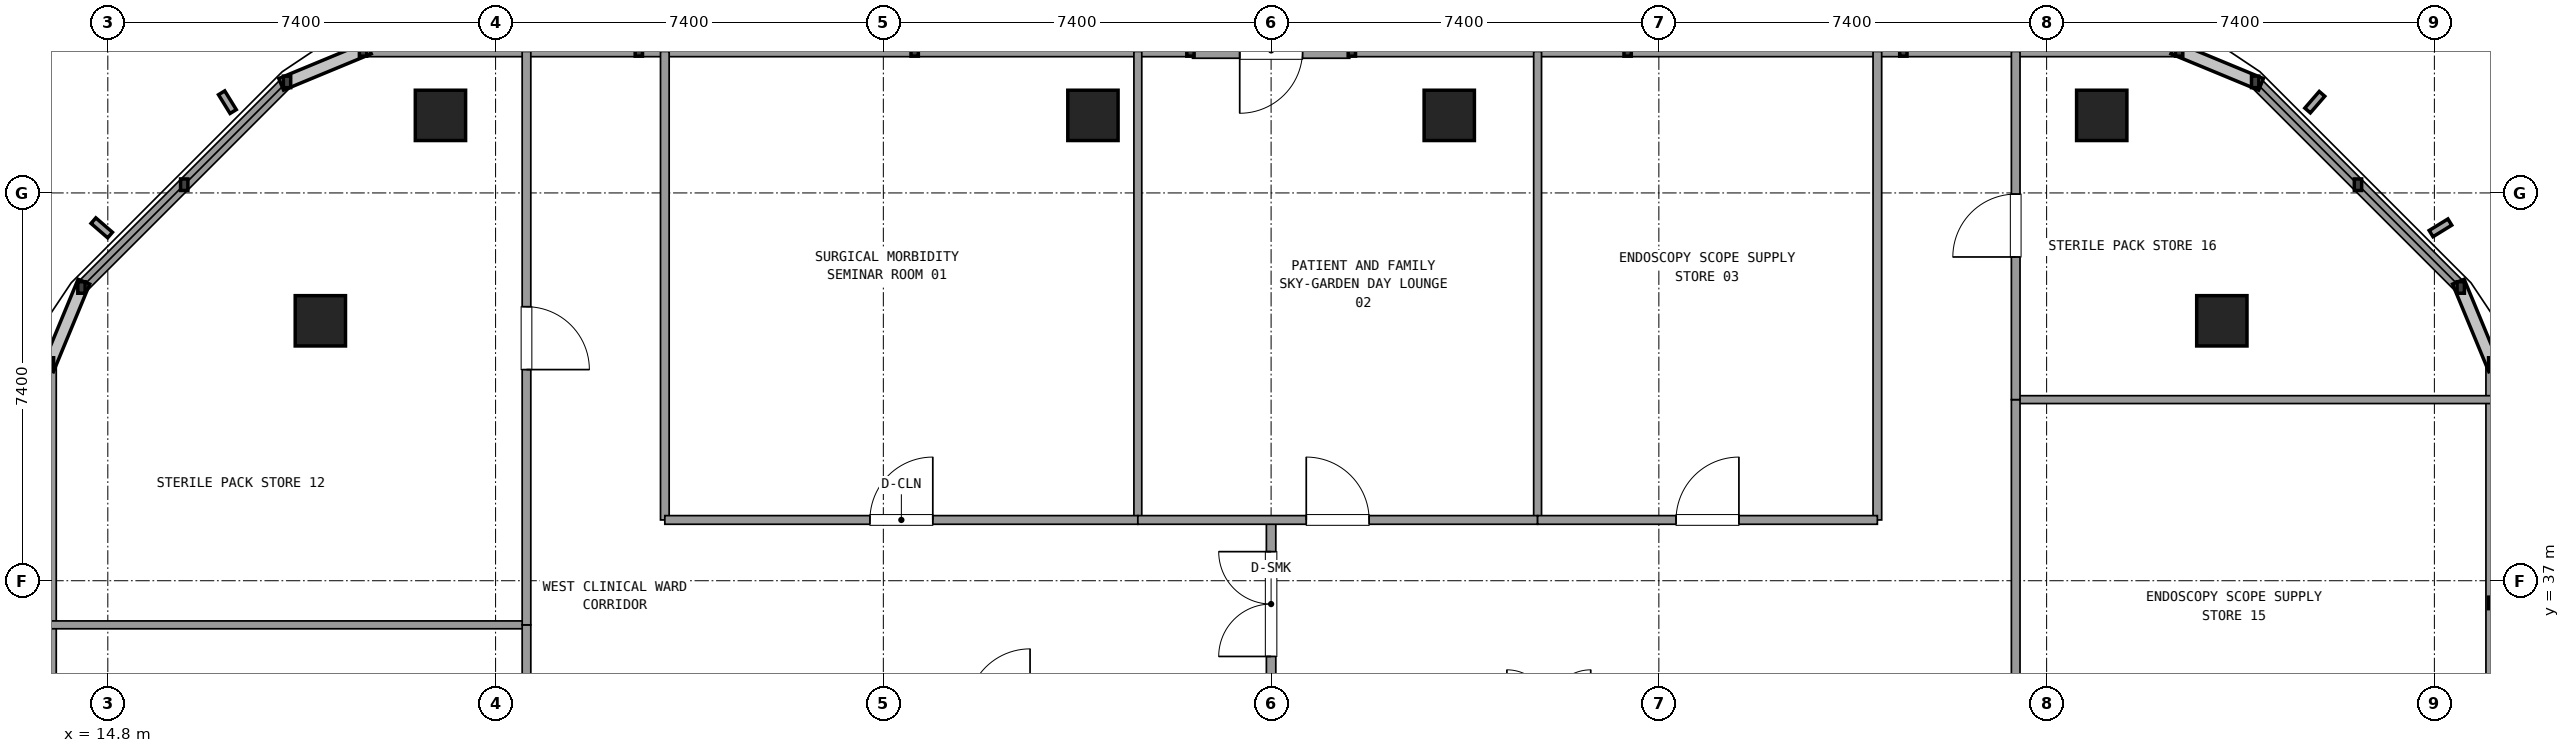
"""IFC4 building model, lengths in metres.
Left out: names, types, materials, properties, quantities, classifications, styles, units other than length and angle.
Written with IfcOpenShell. Run it as: python <this file> out.ifc"""

import sys

from ifc_helpers import new_model, si_unit, direction, frame, frame_2d, origin, origin_2d, place, context, subcontext, project, spatial, rectangle, extrude, element, fill, save


model = new_model("IFC4")
c1 = context("Model", 3, precision=1e-05, world=origin(), true_north=direction((0.0, 1.0)))
c2 = subcontext(c1, "Body", "Model", "MODEL_VIEW")
j1 = project(units=[si_unit("LENGTHUNIT", "METRE"), si_unit("PLANEANGLEUNIT", "RADIAN")], contexts=[c1])
p1 = place(None, origin())
s1 = spatial("IfcSite", under=j1, at=p1, CompositionType="ELEMENT")
p2 = place(p1, origin())
s2 = spatial("IfcBuilding", under=s1, at=p2, CompositionType="ELEMENT")
p3 = place(p2, frame((0.0, 0.0, 174.42)))
s3 = spatial("IfcBuildingStorey", under=s2, at=p3, CompositionType="ELEMENT", Elevation=174.42)
for number, where, z_axis, x_axis in (
    (1, (55.144, 41.96, 0.0), (0.0, 0.0, 1.0), (1.0, 0.0, 0.0)),
    (2, (52.852, 45.88, 0.0), (0.0, 0.0, 1.0), (1.0, 0.0, 0.0)),
):
    element("IfcColumn", number, at=place(p3, frame(where, z_axis=z_axis, x_axis=x_axis)), inside=s3, PredefinedType="COLUMN", context=c2, shape_type="SweptSolid", body=[
        extrude(rectangle(XDim=0.96, YDim=0.96, at=origin_2d()), origin(), (0.0, 0.0, 1.0), 3.578),
    ])
for number, where, z_axis, x_axis in (
    (3, (40.4, 45.88, 0.0), (0.0, 0.0, 1.0), (1.0, 0.0, 0.0)),
    (4, (33.6, 45.88, 0.0), (0.0, 0.0, 1.0), (1.0, 0.0, 0.0)),
):
    element("IfcColumn", number, at=place(p3, frame(where, z_axis=z_axis, x_axis=x_axis)), inside=s3, PredefinedType="COLUMN", context=c2, shape_type="SweptSolid", body=[
        extrude(rectangle(XDim=0.96, YDim=0.96, at=origin_2d()), origin(), (0.0, 0.0, 1.0), 3.579),
    ])
for number, where, z_axis, x_axis in (
    (5, (21.148, 45.88, 0.0), (0.0, 0.0, 1.0), (1.0, 0.0, 0.0)),
    (6, (18.856, 41.96, 0.0), (0.0, 0.0, 1.0), (1.0, 0.0, 0.0)),
):
    element("IfcColumn", number, at=place(p3, frame(where, z_axis=z_axis, x_axis=x_axis)), inside=s3, PredefinedType="COLUMN", context=c2, shape_type="SweptSolid", body=[
        extrude(rectangle(XDim=0.96, YDim=0.96, at=origin_2d()), origin(), (0.0, 0.0, 1.0), 3.578),
    ])
p4 = place(p3, frame((60.304, 27.44, 0.0), z_axis=(0.0, 0.0, 1.0), x_axis=(0.0, 1.0, 0.0)))
e7 = element("IfcWall", 7, at=p4, inside=s3, PredefinedType="SOLIDWALL", context=c2, shape_type="SweptSolid", body=[
    extrude(rectangle(XDim=13.705, YDim=0.24, at=frame_2d((6.853, 0.0))), origin(), (0.0, 0.0, 1.0), 0.85),
])
p5 = place(p3, frame((59.703, 42.596, 0.0), z_axis=(0.0, 0.0, 1.0), x_axis=(-0.707084777957, 0.707128783731, 0.0)))
e8 = element("IfcWall", 8, at=p5, inside=s3, PredefinedType="SOLIDWALL", context=c2, shape_type="SweptSolid", body=[
    extrude(rectangle(XDim=5.548, YDim=0.24, at=frame_2d((2.774, 0.0))), origin(), (0.0, 0.0, 1.0), 0.85),
])
p6 = place(p3, frame((38.501, 47.12, 0.0), z_axis=(0.0, 0.0, 1.0), x_axis=(-1.0, 0.0, 0.0)))
e9 = element("IfcWall", 9, at=p6, inside=s3, PredefinedType="SOLIDWALL", context=c2, shape_type="SweptSolid", body=[
    extrude(rectangle(XDim=3.0, YDim=0.3, at=frame_2d((1.5, 0.0))), origin(), (0.0, 0.0, 1.0), 2.65),
])
p7 = place(p6, frame((0.9, 0.0, 0.0)))
e10 = element("IfcOpeningElement", 10, at=p7, cuts=e9, PredefinedType="OPENING", context=c2, shape_type="SweptSolid", body=[
    extrude(rectangle(XDim=1.2, YDim=2.2, at=frame_2d((0.6, 1.1))), frame((0.0, 0.16, 0.0), z_axis=(0.0, -1.0, 0.0), x_axis=(1.0, 0.0, 0.0)), (0.0, 0.0, 1.0), 0.32),
])
p8 = place(p3, frame((54.329, 47.12, 0.0), z_axis=(0.0, 0.0, 1.0), x_axis=(-1.0, 0.0, 0.0)))
e11 = element("IfcWall", 11, at=p8, inside=s3, PredefinedType="SOLIDWALL", context=c2, shape_type="SweptSolid", body=[
    extrude(rectangle(XDim=15.788, YDim=0.24, at=frame_2d((7.894, 0.0))), origin(), (0.0, 0.0, 1.0), 0.85),
])
p9 = place(p3, frame((35.461, 47.12, 0.0), z_axis=(0.0, 0.0, 1.0), x_axis=(-1.0, 0.0, 0.0)))
e12 = element("IfcWall", 12, at=p9, inside=s3, PredefinedType="SOLIDWALL", context=c2, shape_type="SweptSolid", body=[
    extrude(rectangle(XDim=15.79, YDim=0.24, at=frame_2d((7.895, 0.0))), origin(), (0.0, 0.0, 1.0), 0.85),
])
p10 = place(p3, frame((18.22, 46.519, 0.0), z_axis=(0.0, 0.0, 1.0), x_axis=(-0.707084777957, -0.707128783731, 0.0)))
e13 = element("IfcWall", 13, at=p10, inside=s3, PredefinedType="SOLIDWALL", context=c2, shape_type="SweptSolid", body=[
    extrude(rectangle(XDim=5.548, YDim=0.24, at=frame_2d((2.774, 0.0))), origin(), (0.0, 0.0, 1.0), 0.85),
])
p11 = place(p3, frame((13.696, 41.145, 0.0), z_axis=(0.0, 0.0, 1.0), x_axis=(0.0, -1.0, 0.0)))
e14 = element("IfcWall", 14, at=p11, inside=s3, PredefinedType="SOLIDWALL", context=c2, shape_type="SweptSolid", body=[
    extrude(rectangle(XDim=30.49, YDim=0.24, at=frame_2d((15.245, 0.0))), origin(), (0.0, 0.0, 1.0), 0.85),
])
p12 = place(p3, frame((37.0, 34.95, 0.0), z_axis=(0.0, 0.0, 1.0), x_axis=(0.0, 1.0, 0.0)))
e15 = element("IfcWall", 15, at=p12, inside=s3, PredefinedType="PARTITIONING", context=c2, shape_type="SweptSolid", body=[
    extrude(rectangle(XDim=3.21, YDim=0.18, at=frame_2d((1.605, 0.0))), origin(), (0.0, 0.0, 1.0), 2.59),
])
p13 = place(p12, frame((0.605, 0.0, 0.0)))
e16 = element("IfcOpeningElement", 16, at=p13, cuts=e15, PredefinedType="OPENING", context=c2, shape_type="SweptSolid", body=[
    extrude(rectangle(XDim=2.0, YDim=2.2, at=frame_2d((1.0, 1.1))), frame((0.0, 0.1, 0.0), z_axis=(0.0, -1.0, 0.0), x_axis=(1.0, 0.0, 0.0)), (0.0, 0.0, 1.0), 0.2),
])
for number, where, z_axis, x_axis in (
    (17, (25.43, 38.16, 0.0), (0.0, 0.0, 1.0), (0.0, 1.0, 0.0)),
    (18, (48.57, 38.16, 0.0), (0.0, 0.0, 1.0), (0.0, 1.0, 0.0)),
):
    element("IfcWall", number, at=place(p3, frame(where, z_axis=z_axis, x_axis=x_axis)), inside=s3, PredefinedType="PARTITIONING", context=c2, shape_type="SweptSolid", body=[
        extrude(rectangle(XDim=8.94, YDim=0.165, at=frame_2d((4.47, 0.0))), origin(), (0.0, 0.0, 1.0), 2.59),
    ])
p14 = place(p3, frame((34.457, 38.16, 0.0), z_axis=(0.0, 0.0, 1.0), x_axis=(0.0, 1.0, 0.0)))
e19 = element("IfcWall", 19, at=p14, inside=s3, PredefinedType="PARTITIONING", context=c2, shape_type="SweptSolid", body=[
    extrude(rectangle(XDim=8.94, YDim=0.15, at=frame_2d((4.47, 0.0))), origin(), (0.0, 0.0, 1.0), 2.59),
])
p15 = place(p3, frame((25.43, 38.16, 0.0), z_axis=(0.0, 0.0, 1.0), x_axis=(1.0, 0.0, 0.0)))
e20 = element("IfcWall", 20, at=p15, inside=s3, PredefinedType="PARTITIONING", context=c2, shape_type="SweptSolid", body=[
    extrude(rectangle(XDim=9.027, YDim=0.165, at=frame_2d((4.514, 0.0))), origin(), (0.0, 0.0, 1.0), 2.59),
])
p16 = place(p15, frame((3.914, 0.0, 0.0)))
e21 = element("IfcOpeningElement", 21, at=p16, cuts=e20, PredefinedType="OPENING", context=c2, shape_type="SweptSolid", body=[
    extrude(rectangle(XDim=1.2, YDim=2.15, at=frame_2d((0.6, 1.075))), frame((0.0, 0.093, 0.0), z_axis=(0.0, -1.0, 0.0), x_axis=(1.0, 0.0, 0.0)), (0.0, 0.0, 1.0), 0.185),
])
p17 = place(p3, frame((42.086, 38.16, 0.0), z_axis=(0.0, 0.0, 1.0), x_axis=(0.0, 1.0, 0.0)))
e22 = element("IfcWall", 22, at=p17, inside=s3, PredefinedType="PARTITIONING", context=c2, shape_type="SweptSolid", body=[
    extrude(rectangle(XDim=8.94, YDim=0.15, at=frame_2d((4.47, 0.0))), origin(), (0.0, 0.0, 1.0), 2.59),
])
p18 = place(p3, frame((34.457, 38.16, 0.0), z_axis=(0.0, 0.0, 1.0), x_axis=(1.0, 0.0, 0.0)))
e23 = element("IfcWall", 23, at=p18, inside=s3, PredefinedType="PARTITIONING", context=c2, shape_type="SweptSolid", body=[
    extrude(rectangle(XDim=7.629, YDim=0.165, at=frame_2d((3.814, 0.0))), origin(), (0.0, 0.0, 1.0), 2.59),
])
p19 = place(p18, frame((3.214, 0.0, 0.0)))
e24 = element("IfcOpeningElement", 24, at=p19, cuts=e23, PredefinedType="OPENING", context=c2, shape_type="SweptSolid", body=[
    extrude(rectangle(XDim=1.2, YDim=2.15, at=frame_2d((0.6, 1.075))), frame((0.0, 0.093, 0.0), z_axis=(0.0, -1.0, 0.0), x_axis=(1.0, 0.0, 0.0)), (0.0, 0.0, 1.0), 0.185),
])
p20 = place(p3, frame((42.086, 38.16, 0.0), z_axis=(0.0, 0.0, 1.0), x_axis=(1.0, 0.0, 0.0)))
e25 = element("IfcWall", 25, at=p20, inside=s3, PredefinedType="PARTITIONING", context=c2, shape_type="SweptSolid", body=[
    extrude(rectangle(XDim=6.484, YDim=0.165, at=frame_2d((3.242, 0.0))), origin(), (0.0, 0.0, 1.0), 2.59),
])
p21 = place(p20, frame((2.642, 0.0, 0.0)))
e26 = element("IfcOpeningElement", 26, at=p21, cuts=e25, PredefinedType="OPENING", context=c2, shape_type="SweptSolid", body=[
    extrude(rectangle(XDim=1.2, YDim=2.15, at=frame_2d((0.6, 1.075))), frame((0.0, 0.093, 0.0), z_axis=(0.0, -1.0, 0.0), x_axis=(1.0, 0.0, 0.0)), (0.0, 0.0, 1.0), 0.185),
])
p22 = place(p3, frame((22.79, 36.158, 0.0), z_axis=(0.0, 0.0, 1.0), x_axis=(-1.0, 0.0, 0.0)))
e27 = element("IfcWall", 27, at=p22, inside=s3, PredefinedType="PARTITIONING", context=c2, shape_type="SweptSolid", body=[
    extrude(rectangle(XDim=9.074, YDim=0.15, at=frame_2d((4.537, 0.0))), origin(), (0.0, 0.0, 1.0), 2.59),
])
p23 = place(p3, frame((22.79, 27.56, 0.0), z_axis=(0.0, 0.0, 1.0), x_axis=(0.0, 1.0, 0.0)))
e28 = element("IfcWall", 28, at=p23, inside=s3, PredefinedType="PARTITIONING", context=c2, shape_type="SweptSolid", body=[
    extrude(rectangle(XDim=8.598, YDim=0.165, at=frame_2d((4.299, 0.0))), origin(), (0.0, 0.0, 1.0), 2.59),
])
p24 = place(p23, frame((3.699, 0.0, 0.0)))
e29 = element("IfcOpeningElement", 29, at=p24, cuts=e28, PredefinedType="OPENING", context=c2, shape_type="SweptSolid", body=[
    extrude(rectangle(XDim=1.2, YDim=2.15, at=frame_2d((0.6, 1.075))), frame((0.0, 0.093, 0.0), z_axis=(0.0, -1.0, 0.0), x_axis=(1.0, 0.0, 0.0)), (0.0, 0.0, 1.0), 0.185),
])
p25 = place(p3, frame((22.79, 36.158, 0.0), z_axis=(0.0, 0.0, 1.0), x_axis=(0.0, 1.0, 0.0)))
e30 = element("IfcWall", 30, at=p25, inside=s3, PredefinedType="PARTITIONING", context=c2, shape_type="SweptSolid", body=[
    extrude(rectangle(XDim=10.942, YDim=0.165, at=frame_2d((5.471, 0.0))), origin(), (0.0, 0.0, 1.0), 2.59),
])
p26 = place(p25, frame((4.871, 0.0, 0.0)))
e31 = element("IfcOpeningElement", 31, at=p26, cuts=e30, PredefinedType="OPENING", context=c2, shape_type="SweptSolid", body=[
    extrude(rectangle(XDim=1.2, YDim=2.15, at=frame_2d((0.6, 1.075))), frame((0.0, 0.093, 0.0), z_axis=(0.0, -1.0, 0.0), x_axis=(1.0, 0.0, 0.0)), (0.0, 0.0, 1.0), 0.185),
])
p27 = place(p3, frame((51.21, 40.456, 0.0), z_axis=(0.0, 0.0, 1.0), x_axis=(1.0, 0.0, 0.0)))
e32 = element("IfcWall", 32, at=p27, inside=s3, PredefinedType="PARTITIONING", context=c2, shape_type="SweptSolid", body=[
    extrude(rectangle(XDim=9.074, YDim=0.15, at=frame_2d((4.537, 0.0))), origin(), (0.0, 0.0, 1.0), 2.59),
])
p28 = place(p3, frame((51.21, 27.56, 0.0), z_axis=(0.0, 0.0, 1.0), x_axis=(0.0, 1.0, 0.0)))
e33 = element("IfcWall", 33, at=p28, inside=s3, PredefinedType="PARTITIONING", context=c2, shape_type="SweptSolid", body=[
    extrude(rectangle(XDim=12.896, YDim=0.165, at=frame_2d((6.448, 0.0))), origin(), (0.0, 0.0, 1.0), 2.59),
])
p29 = place(p28, frame((5.848, 0.0, 0.0)))
e34 = element("IfcOpeningElement", 34, at=p29, cuts=e33, PredefinedType="OPENING", context=c2, shape_type="SweptSolid", body=[
    extrude(rectangle(XDim=1.2, YDim=2.15, at=frame_2d((0.6, 1.075))), frame((0.0, 0.093, 0.0), z_axis=(0.0, -1.0, 0.0), x_axis=(1.0, 0.0, 0.0)), (0.0, 0.0, 1.0), 0.185),
])
p30 = place(p3, frame((51.21, 40.456, 0.0), z_axis=(0.0, 0.0, 1.0), x_axis=(0.0, 1.0, 0.0)))
e35 = element("IfcWall", 35, at=p30, inside=s3, PredefinedType="PARTITIONING", context=c2, shape_type="SweptSolid", body=[
    extrude(rectangle(XDim=6.644, YDim=0.165, at=frame_2d((3.322, 0.0))), origin(), (0.0, 0.0, 1.0), 2.59),
])
p31 = place(p30, frame((2.722, 0.0, 0.0)))
e36 = element("IfcOpeningElement", 36, at=p31, cuts=e35, PredefinedType="OPENING", context=c2, shape_type="SweptSolid", body=[
    extrude(rectangle(XDim=1.2, YDim=2.15, at=frame_2d((0.6, 1.075))), frame((0.0, 0.093, 0.0), z_axis=(0.0, -1.0, 0.0), x_axis=(1.0, 0.0, 0.0)), (0.0, 0.0, 1.0), 0.185),
])
p32 = place(p13, origin())
e37 = element("IfcDoor", 37, at=p32, inside=s3, OperationType="DOUBLE_DOOR_SINGLE_SWING", PredefinedType="DOOR", context=c2, shape_type="SweptSolid", body=[
    extrude(rectangle(XDim=2.0, YDim=2.2, at=frame_2d((1.0, 1.1))), frame((0.0, 0.025, 0.0), z_axis=(0.0, -1.0, 0.0), x_axis=(1.0, 0.0, 0.0)), (0.0, 0.0, 1.0), 0.05),
])
fill(e16, e37)
p33 = place(p16, origin())
e38 = element("IfcDoor", 38, at=p33, inside=s3, OperationType="SINGLE_SWING_RIGHT", PredefinedType="DOOR", context=c2, shape_type="SweptSolid", body=[
    extrude(rectangle(XDim=1.2, YDim=2.15, at=frame_2d((0.6, 1.075))), frame((0.0, 0.025, 0.0), z_axis=(0.0, -1.0, 0.0), x_axis=(1.0, 0.0, 0.0)), (0.0, 0.0, 1.0), 0.05),
])
fill(e21, e38)
p34 = place(p19, origin())
e39 = element("IfcDoor", 39, at=p34, inside=s3, OperationType="SINGLE_SWING_LEFT", PredefinedType="DOOR", context=c2, shape_type="SweptSolid", body=[
    extrude(rectangle(XDim=1.2, YDim=2.15, at=frame_2d((0.6, 1.075))), frame((0.0, 0.025, 0.0), z_axis=(0.0, -1.0, 0.0), x_axis=(1.0, 0.0, 0.0)), (0.0, 0.0, 1.0), 0.05),
])
fill(e24, e39)
p35 = place(p21, origin())
e40 = element("IfcDoor", 40, at=p35, inside=s3, OperationType="SINGLE_SWING_RIGHT", PredefinedType="DOOR", context=c2, shape_type="SweptSolid", body=[
    extrude(rectangle(XDim=1.2, YDim=2.15, at=frame_2d((0.6, 1.075))), frame((0.0, 0.025, 0.0), z_axis=(0.0, -1.0, 0.0), x_axis=(1.0, 0.0, 0.0)), (0.0, 0.0, 1.0), 0.05),
])
fill(e26, e40)
p36 = place(p26, frame((1.2, 0.0, 0.0), z_axis=(0.0, 0.0, 1.0), x_axis=(-1.0, 0.0, 0.0)))
e41 = element("IfcDoor", 41, at=p36, inside=s3, OperationType="SINGLE_SWING_LEFT", PredefinedType="DOOR", context=c2, shape_type="SweptSolid", body=[
    extrude(rectangle(XDim=1.2, YDim=2.15, at=frame_2d((0.6, 1.075))), frame((0.0, 0.025, 0.0), z_axis=(0.0, -1.0, 0.0), x_axis=(1.0, 0.0, 0.0)), (0.0, 0.0, 1.0), 0.05),
])
fill(e31, e41)
p37 = place(p31, origin())
e42 = element("IfcDoor", 42, at=p37, inside=s3, OperationType="SINGLE_SWING_LEFT", PredefinedType="DOOR", context=c2, shape_type="SweptSolid", body=[
    extrude(rectangle(XDim=1.2, YDim=2.15, at=frame_2d((0.6, 1.075))), frame((0.0, 0.025, 0.0), z_axis=(0.0, -1.0, 0.0), x_axis=(1.0, 0.0, 0.0)), (0.0, 0.0, 1.0), 0.05),
])
fill(e36, e42)
save(model, sys.argv[1])
